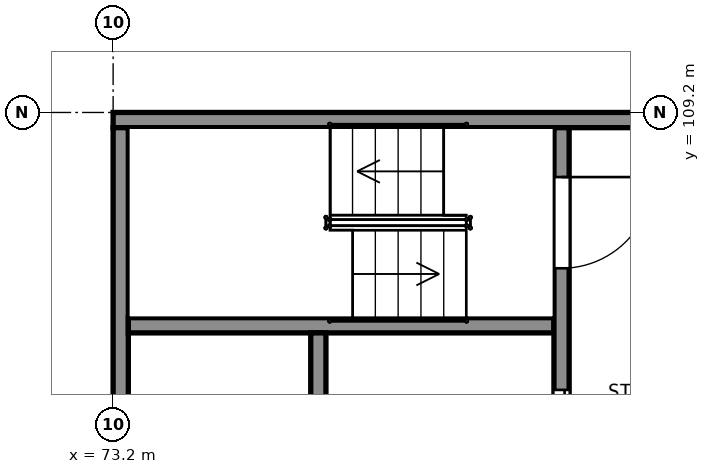
"""IFC4 building model, lengths in metres.
Left out: names, types, materials, properties, quantities, classifications, styles, units other than length and angle.
Written with IfcOpenShell. Run it as: python <this file> out.ifc"""

import sys

from ifc_helpers import new_model, si_unit, direction, frame, frame_2d, origin, place, context, subcontext, project, spatial, rectangle, extrude, element, fill, save


model = new_model("IFC4")
c1 = context("Model", 3, precision=1e-05, world=origin(), true_north=direction((0.0, 1.0)))
c2 = subcontext(c1, "Body", "Model", "MODEL_VIEW")
j1 = project(units=[si_unit("LENGTHUNIT", "METRE"), si_unit("PLANEANGLEUNIT", "RADIAN")], contexts=[c1])
p1 = place(None, origin())
s1 = spatial("IfcSite", under=j1, at=p1, CompositionType="ELEMENT")
p2 = place(p1, origin())
s2 = spatial("IfcBuilding", under=s1, at=p2, CompositionType="ELEMENT")
p3 = place(p2, frame((0.0, 0.0, 25.0)))
s3 = spatial("IfcBuildingStorey", under=s2, at=p3, CompositionType="ELEMENT", Elevation=25.0)
p4 = place(p3, frame((73.2, 109.1, 0.0), z_axis=(0.0, 0.0, 1.0), x_axis=(1.0, 0.0, 0.0)))
e1 = element("IfcWall", 1, at=p4, inside=s3, PredefinedType="SHEAR", context=c2, shape_type="SweptSolid", body=[
    extrude(rectangle(XDim=8.4, YDim=0.2, at=frame_2d((4.2, 0.0))), origin(), (0.0, 0.0, 1.0), 5.0),
])
p5 = place(p3, frame((73.3, 101.0, 0.0), z_axis=(0.0, 0.0, 1.0), x_axis=(0.0, 1.0, 0.0)))
e2 = element("IfcWall", 2, at=p5, inside=s3, PredefinedType="SHEAR", context=c2, shape_type="SweptSolid", body=[
    extrude(rectangle(XDim=8.0, YDim=0.2, at=frame_2d((4.0, 0.0))), origin(), (0.0, 0.0, 1.0), 5.0),
])
p6 = place(p3, frame((79.1, 101.0, 0.0), z_axis=(0.0, 0.0, 1.0), x_axis=(0.0, 1.0, 0.0)))
e3 = element("IfcWall", 3, at=p6, inside=s3, PredefinedType="SHEAR", context=c2, shape_type="SweptSolid", body=[
    extrude(rectangle(XDim=8.0, YDim=0.2, at=frame_2d((4.0, 0.0))), origin(), (0.0, 0.0, 1.0), 5.0),
])
p7 = place(p6, frame((0.65, 0.0, 0.0)))
e4 = element("IfcOpeningElement", 4, at=p7, cuts=e3, PredefinedType="OPENING", context=c2, shape_type="SweptSolid", body=[
    extrude(rectangle(XDim=1.2, YDim=2.1, at=frame_2d((0.6, 1.05))), frame((0.0, 0.11, 0.0), z_axis=(0.0, -1.0, 0.0), x_axis=(1.0, 0.0, 0.0)), (0.0, 0.0, 1.0), 0.22),
])
p8 = place(p6, frame((6.15, 0.0, 0.0)))
e5 = element("IfcOpeningElement", 5, at=p8, cuts=e3, PredefinedType="OPENING", context=c2, shape_type="SweptSolid", body=[
    extrude(rectangle(XDim=1.2, YDim=2.1, at=frame_2d((0.6, 1.05))), frame((0.0, 0.11, 0.0), z_axis=(0.0, -1.0, 0.0), x_axis=(1.0, 0.0, 0.0)), (0.0, 0.0, 1.0), 0.22),
])
p9 = place(p6, frame((3.45, 0.0, 0.0)))
e6 = element("IfcOpeningElement", 6, at=p9, cuts=e3, PredefinedType="OPENING", context=c2, shape_type="SweptSolid", body=[
    extrude(rectangle(XDim=1.1, YDim=2.1, at=frame_2d((0.55, 1.05))), frame((0.0, 0.11, 0.0), z_axis=(0.0, -1.0, 0.0), x_axis=(1.0, 0.0, 0.0)), (0.0, 0.0, 1.0), 0.22),
])
p10 = place(p3, frame((73.4, 106.4, 0.0), z_axis=(0.0, 0.0, 1.0), x_axis=(1.0, 0.0, 0.0)))
e7 = element("IfcWall", 7, at=p10, inside=s3, PredefinedType="SHEAR", context=c2, shape_type="SweptSolid", body=[
    extrude(rectangle(XDim=5.6, YDim=0.2, at=frame_2d((2.8, 0.0))), origin(), (0.0, 0.0, 1.0), 5.0),
])
p11 = place(p3, frame((75.9, 103.7, 0.0), z_axis=(0.0, 0.0, 1.0), x_axis=(0.0, 1.0, 0.0)))
e8 = element("IfcWall", 8, at=p11, inside=s3, PredefinedType="SHEAR", context=c2, shape_type="SweptSolid", body=[
    extrude(rectangle(XDim=2.6, YDim=0.2, at=frame_2d((1.3, 0.0))), origin(), (0.0, 0.0, 1.0), 5.0),
])
p12 = place(p8, origin())
e9 = element("IfcDoor", 9, at=p12, inside=s3, OperationType="SINGLE_SWING_RIGHT", PredefinedType="DOOR", context=c2, shape_type="SweptSolid", body=[
    extrude(rectangle(XDim=1.2, YDim=2.1, at=frame_2d((0.6, 1.05))), frame((0.0, 0.025, 0.0), z_axis=(0.0, -1.0, 0.0), x_axis=(1.0, 0.0, 0.0)), (0.0, 0.0, 1.0), 0.05),
])
fill(e5, e9)
p13 = place(p9, origin())
e10 = element("IfcDoor", 10, at=p13, inside=s3, OperationType="DOUBLE_DOOR_SLIDING", PredefinedType="DOOR", context=c2, shape_type="SweptSolid", body=[
    extrude(rectangle(XDim=1.1, YDim=2.1, at=frame_2d((0.55, 1.05))), frame((0.0, 0.025, 0.0), z_axis=(0.0, -1.0, 0.0), x_axis=(1.0, 0.0, 0.0)), (0.0, 0.0, 1.0), 0.05),
])
fill(e6, e10)
save(model, sys.argv[1])
